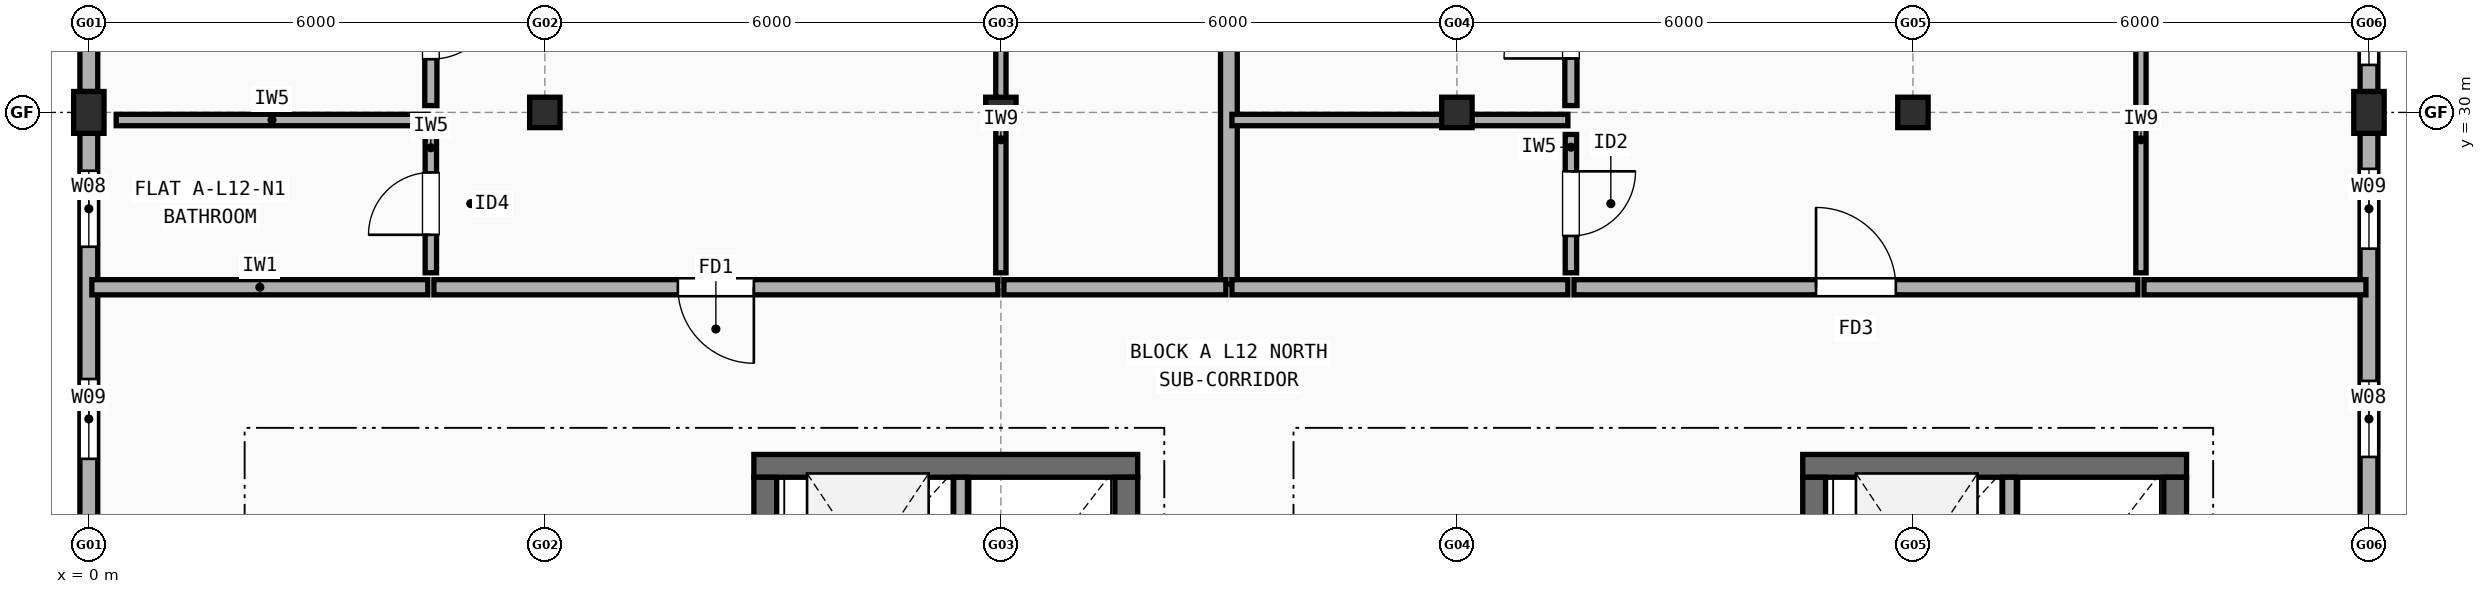
"""IFC4 building model, lengths in metres.
Left out: names, types, materials, properties, quantities, classifications, styles, units other than length and angle.
Written with IfcOpenShell. Run it as: python <this file> out.ifc"""

import sys

from ifc_helpers import new_model, si_unit, direction, frame, frame_2d, origin, origin_2d, place, context, subcontext, project, spatial, rectangle, extrude, element, fill, save


model = new_model("IFC4")
c1 = context("Model", 3, precision=1e-05, world=origin(), true_north=direction((0.0, 1.0)))
c2 = subcontext(c1, "Body", "Model", "MODEL_VIEW")
j1 = project(units=[si_unit("LENGTHUNIT", "METRE"), si_unit("PLANEANGLEUNIT", "RADIAN")], contexts=[c1])
p1 = place(None, origin())
s1 = spatial("IfcSite", under=j1, at=p1, CompositionType="ELEMENT")
p2 = place(p1, origin())
s2 = spatial("IfcBuilding", under=s1, at=p2, CompositionType="ELEMENT")
p3 = place(p2, frame((0.0, 0.0, 39.7)))
s3 = spatial("IfcBuildingStorey", under=s2, at=p3, CompositionType="ELEMENT", Elevation=39.7)
p4 = place(p3, frame((0.0, 30.0, 0.0), z_axis=(0.0, 0.0, 1.0), x_axis=(1.0, 0.0, 0.0)))
e1 = element("IfcColumn", 1, at=p4, inside=s3, PredefinedType="COLUMN", context=c2, shape_type="SweptSolid", body=[
    extrude(rectangle(XDim=0.4, YDim=0.55, at=origin_2d()), origin(), (0.0, 0.0, 1.0), 3.0),
])
for number, where, z_axis, x_axis in (
    (2, (6.0, 30.0, 0.0), (0.0, 0.0, 1.0), (1.0, 0.0, 0.0)),
    (3, (12.0, 30.0, 0.0), (0.0, 0.0, 1.0), (1.0, 0.0, 0.0)),
    (4, (18.0, 30.0, 0.0), (0.0, 0.0, 1.0), (1.0, 0.0, 0.0)),
    (5, (24.0, 30.0, 0.0), (0.0, 0.0, 1.0), (1.0, 0.0, 0.0)),
):
    element("IfcColumn", number, at=place(p3, frame(where, z_axis=z_axis, x_axis=x_axis)), inside=s3, PredefinedType="COLUMN", context=c2, shape_type="SweptSolid", body=[
        extrude(rectangle(XDim=0.4, YDim=0.4, at=origin_2d()), origin(), (0.0, 0.0, 1.0), 3.0),
    ])
p5 = place(p3, frame((30.0, 30.0, 0.0), z_axis=(0.0, 0.0, 1.0), x_axis=(1.0, 0.0, 0.0)))
e6 = element("IfcColumn", 6, at=p5, inside=s3, PredefinedType="COLUMN", context=c2, shape_type="SweptSolid", body=[
    extrude(rectangle(XDim=0.4, YDim=0.55, at=origin_2d()), origin(), (0.0, 0.0, 1.0), 3.0),
])
p6 = place(p3, frame((30.0, 24.275, 0.0), z_axis=(0.0, 0.0, 1.0), x_axis=(0.0, 1.0, 0.0)))
e7 = element("IfcWall", 7, at=p6, inside=s3, PredefinedType="STANDARD", context=c2, shape_type="SweptSolid", body=[
    extrude(rectangle(XDim=5.45, YDim=0.235, at=frame_2d((2.725, 0.0))), origin(), (0.0, 0.0, 1.0), 2.482),
])
p7 = place(p6, frame((1.192, 0.0, 0.9)))
e8 = element("IfcOpeningElement", 8, at=p7, cuts=e7, PredefinedType="OPENING", context=c2, shape_type="SweptSolid", body=[
    extrude(rectangle(XDim=1.0, YDim=1.4, at=frame_2d((0.5, 0.7))), frame((0.0, 0.127, 0.0), z_axis=(0.0, -1.0, 0.0), x_axis=(1.0, 0.0, 0.0)), (0.0, 0.0, 1.0), 0.255),
])
p8 = place(p6, frame((3.933, 0.0, 0.9)))
e9 = element("IfcOpeningElement", 9, at=p8, cuts=e7, PredefinedType="OPENING", context=c2, shape_type="SweptSolid", body=[
    extrude(rectangle(XDim=1.05, YDim=1.35, at=frame_2d((0.525, 0.675))), frame((0.0, 0.127, 0.0), z_axis=(0.0, -1.0, 0.0), x_axis=(1.0, 0.0, 0.0)), (0.0, 0.0, 1.0), 0.255),
])
p9 = place(p3, frame((30.0, 30.275, 0.0), z_axis=(0.0, 0.0, 1.0), x_axis=(0.0, 1.0, 0.0)))
e10 = element("IfcWall", 10, at=p9, inside=s3, PredefinedType="STANDARD", context=c2, shape_type="SweptSolid", body=[
    extrude(rectangle(XDim=5.45, YDim=0.235, at=frame_2d((2.725, 0.0))), origin(), (0.0, 0.0, 1.0), 2.482),
])
p10 = place(p9, frame((0.35, 0.0, 0.9)))
e11 = element("IfcOpeningElement", 11, at=p10, cuts=e10, PredefinedType="OPENING", context=c2, shape_type="SweptSolid", body=[
    extrude(rectangle(XDim=1.2, YDim=1.35, at=frame_2d((0.6, 0.675))), frame((0.0, 0.127, 0.0), z_axis=(0.0, -1.0, 0.0), x_axis=(1.0, 0.0, 0.0)), (0.0, 0.0, 1.0), 0.255),
])
p11 = place(p9, frame((3.9, 0.0, 0.9)))
e12 = element("IfcOpeningElement", 12, at=p11, cuts=e10, PredefinedType="OPENING", context=c2, shape_type="SweptSolid", body=[
    extrude(rectangle(XDim=1.2, YDim=1.35, at=frame_2d((0.6, 0.675))), frame((0.0, 0.127, 0.0), z_axis=(0.0, -1.0, 0.0), x_axis=(1.0, 0.0, 0.0)), (0.0, 0.0, 1.0), 0.255),
])
p12 = place(p3, frame((0.0, 35.725, 0.0), z_axis=(0.0, 0.0, 1.0), x_axis=(0.0, -1.0, 0.0)))
e13 = element("IfcWall", 13, at=p12, inside=s3, PredefinedType="STANDARD", context=c2, shape_type="SweptSolid", body=[
    extrude(rectangle(XDim=5.45, YDim=0.235, at=frame_2d((2.725, 0.0))), origin(), (0.0, 0.0, 1.0), 2.482),
])
p13 = place(p12, frame((1.192, 0.0, 0.9)))
e14 = element("IfcOpeningElement", 14, at=p13, cuts=e13, PredefinedType="OPENING", context=c2, shape_type="SweptSolid", body=[
    extrude(rectangle(XDim=0.9, YDim=1.4, at=frame_2d((0.45, 0.7))), frame((0.0, 0.127, 0.0), z_axis=(0.0, -1.0, 0.0), x_axis=(1.0, 0.0, 0.0)), (0.0, 0.0, 1.0), 0.255),
])
p14 = place(p12, frame((3.933, 0.0, 0.9)))
e15 = element("IfcOpeningElement", 15, at=p14, cuts=e13, PredefinedType="OPENING", context=c2, shape_type="SweptSolid", body=[
    extrude(rectangle(XDim=0.95, YDim=1.35, at=frame_2d((0.475, 0.675))), frame((0.0, 0.127, 0.0), z_axis=(0.0, -1.0, 0.0), x_axis=(1.0, 0.0, 0.0)), (0.0, 0.0, 1.0), 0.255),
])
p15 = place(p3, frame((0.0, 29.725, 0.0), z_axis=(0.0, 0.0, 1.0), x_axis=(0.0, -1.0, 0.0)))
e16 = element("IfcWall", 16, at=p15, inside=s3, PredefinedType="STANDARD", context=c2, shape_type="SweptSolid", body=[
    extrude(rectangle(XDim=5.45, YDim=0.235, at=frame_2d((2.725, 0.0))), origin(), (0.0, 0.0, 1.0), 2.482),
])
p16 = place(p15, frame((0.492, 0.0, 0.9)))
e17 = element("IfcOpeningElement", 17, at=p16, cuts=e16, PredefinedType="OPENING", context=c2, shape_type="SweptSolid", body=[
    extrude(rectangle(XDim=1.0, YDim=1.4, at=frame_2d((0.5, 0.7))), frame((0.0, 0.127, 0.0), z_axis=(0.0, -1.0, 0.0), x_axis=(1.0, 0.0, 0.0)), (0.0, 0.0, 1.0), 0.255),
])
p17 = place(p15, frame((3.232, 0.0, 0.9)))
e18 = element("IfcOpeningElement", 18, at=p17, cuts=e16, PredefinedType="OPENING", context=c2, shape_type="SweptSolid", body=[
    extrude(rectangle(XDim=1.05, YDim=1.35, at=frame_2d((0.525, 0.675))), frame((0.0, 0.127, 0.0), z_axis=(0.0, -1.0, 0.0), x_axis=(1.0, 0.0, 0.0)), (0.0, 0.0, 1.0), 0.255),
])
p18 = place(p3, frame((13.8, 25.35, 0.0), z_axis=(0.0, 0.0, 1.0), x_axis=(-1.0, 0.0, 0.0)))
e19 = element("IfcWall", 19, at=p18, inside=s3, PredefinedType="SHEAR", context=c2, shape_type="SweptSolid", body=[
    extrude(rectangle(XDim=5.05, YDim=0.3, at=frame_2d((2.525, 0.0))), origin(), (0.0, 0.0, 1.0), 3.0),
])
p19 = place(p3, frame((13.65, 18.75, 0.0), z_axis=(0.0, 0.0, 1.0), x_axis=(0.0, 1.0, 0.0)))
e20 = element("IfcWall", 20, at=p19, inside=s3, PredefinedType="SHEAR", context=c2, shape_type="SweptSolid", body=[
    extrude(rectangle(XDim=6.45, YDim=0.3, at=frame_2d((3.225, 0.0))), origin(), (0.0, 0.0, 1.0), 3.0),
])
p20 = place(p3, frame((8.9, 21.75, 0.0), z_axis=(0.0, 0.0, 1.0), x_axis=(0.0, 1.0, 0.0)))
e21 = element("IfcWall", 21, at=p20, inside=s3, PredefinedType="SHEAR", context=c2, shape_type="SweptSolid", body=[
    extrude(rectangle(XDim=3.45, YDim=0.3, at=frame_2d((1.725, 0.0))), origin(), (0.0, 0.0, 1.0), 3.0),
])
p21 = place(p3, frame((11.47, 22.94, 0.0), z_axis=(0.0, 0.0, 1.0), x_axis=(0.0, 1.0, 0.0)))
e22 = element("IfcWall", 22, at=p21, inside=s3, PredefinedType="SOLIDWALL", context=c2, shape_type="SweptSolid", body=[
    extrude(rectangle(XDim=2.26, YDim=0.18, at=frame_2d((1.13, 0.0))), origin(), (0.0, 0.0, 1.0), 3.0),
])
p22 = place(p3, frame((27.6, 25.35, 0.0), z_axis=(0.0, 0.0, 1.0), x_axis=(-1.0, 0.0, 0.0)))
e23 = element("IfcWall", 23, at=p22, inside=s3, PredefinedType="SHEAR", context=c2, shape_type="SweptSolid", body=[
    extrude(rectangle(XDim=5.05, YDim=0.3, at=frame_2d((2.525, 0.0))), origin(), (0.0, 0.0, 1.0), 3.0),
])
p23 = place(p3, frame((27.45, 18.75, 0.0), z_axis=(0.0, 0.0, 1.0), x_axis=(0.0, 1.0, 0.0)))
e24 = element("IfcWall", 24, at=p23, inside=s3, PredefinedType="SHEAR", context=c2, shape_type="SweptSolid", body=[
    extrude(rectangle(XDim=6.45, YDim=0.3, at=frame_2d((3.225, 0.0))), origin(), (0.0, 0.0, 1.0), 3.0),
])
p24 = place(p3, frame((22.7, 21.75, 0.0), z_axis=(0.0, 0.0, 1.0), x_axis=(0.0, 1.0, 0.0)))
e25 = element("IfcWall", 25, at=p24, inside=s3, PredefinedType="SHEAR", context=c2, shape_type="SweptSolid", body=[
    extrude(rectangle(XDim=3.45, YDim=0.3, at=frame_2d((1.725, 0.0))), origin(), (0.0, 0.0, 1.0), 3.0),
])
p25 = place(p3, frame((25.27, 22.94, 0.0), z_axis=(0.0, 0.0, 1.0), x_axis=(0.0, 1.0, 0.0)))
e26 = element("IfcWall", 26, at=p25, inside=s3, PredefinedType="SOLIDWALL", context=c2, shape_type="SweptSolid", body=[
    extrude(rectangle(XDim=2.26, YDim=0.18, at=frame_2d((1.13, 0.0))), origin(), (0.0, 0.0, 1.0), 3.0),
])
p26 = place(p3, frame((15.0, 27.74, 0.0), z_axis=(0.0, 0.0, 1.0), x_axis=(0.0, 1.0, 0.0)))
e27 = element("IfcWall", 27, at=p26, inside=s3, PredefinedType="SOLIDWALL", context=c2, shape_type="SweptSolid", body=[
    extrude(rectangle(XDim=7.87, YDim=0.22, at=frame_2d((3.935, 0.0))), origin(), (0.0, 0.0, 1.0), 2.532),
])
p27 = place(p3, frame((0.04, 27.7, 0.0), z_axis=(0.0, 0.0, 1.0), x_axis=(1.0, 0.0, 0.0)))
e28 = element("IfcWall", 28, at=p27, inside=s3, PredefinedType="SOLIDWALL", context=c2, shape_type="SweptSolid", body=[
    extrude(rectangle(XDim=4.42, YDim=0.2, at=frame_2d((2.21, 0.0))), origin(), (0.0, 0.0, 1.0), 2.482),
])
p28 = place(p3, frame((4.54, 27.7, 0.0), z_axis=(0.0, 0.0, 1.0), x_axis=(1.0, 0.0, 0.0)))
e29 = element("IfcWall", 29, at=p28, inside=s3, PredefinedType="SOLIDWALL", context=c2, shape_type="SweptSolid", body=[
    extrude(rectangle(XDim=7.42, YDim=0.2, at=frame_2d((3.71, 0.0))), origin(), (0.0, 0.0, 1.0), 2.508),
])
p29 = place(p28, frame((3.21, 0.0, 0.0)))
e30 = element("IfcOpeningElement", 30, at=p29, cuts=e29, PredefinedType="OPENING", context=c2, shape_type="SweptSolid", body=[
    extrude(rectangle(XDim=1.0, YDim=2.15, at=frame_2d((0.5, 1.075))), frame((0.0, 0.11, 0.0), z_axis=(0.0, -1.0, 0.0), x_axis=(1.0, 0.0, 0.0)), (0.0, 0.0, 1.0), 0.22),
])
p30 = place(p3, frame((4.5, 30.09, 0.0), z_axis=(0.0, 0.0, 1.0), x_axis=(0.0, 1.0, 0.0)))
e31 = element("IfcWall", 31, at=p30, inside=s3, PredefinedType="PLUMBINGWALL", context=c2, shape_type="SweptSolid", body=[
    extrude(rectangle(XDim=2.12, YDim=0.16, at=frame_2d((1.06, 0.0))), origin(), (0.0, 0.0, 1.0), 2.532),
])
p31 = place(p30, frame((0.61, 0.0, 0.0)))
e32 = element("IfcOpeningElement", 32, at=p31, cuts=e31, PredefinedType="OPENING", context=c2, shape_type="SweptSolid", body=[
    extrude(rectangle(XDim=0.9, YDim=2.1, at=frame_2d((0.45, 1.05))), frame((0.0, 0.09, 0.0), z_axis=(0.0, -1.0, 0.0), x_axis=(1.0, 0.0, 0.0)), (0.0, 0.0, 1.0), 0.18),
])
p32 = place(p3, frame((4.5, 27.89, 0.0), z_axis=(0.0, 0.0, 1.0), x_axis=(0.0, 1.0, 0.0)))
e33 = element("IfcWall", 33, at=p32, inside=s3, PredefinedType="PARTITIONING", context=c2, shape_type="SweptSolid", body=[
    extrude(rectangle(XDim=1.82, YDim=0.15, at=frame_2d((0.91, 0.0))), origin(), (0.0, 0.0, 1.0), 3.0),
])
p33 = place(p32, frame((0.5, 0.0, 0.0)))
e34 = element("IfcOpeningElement", 34, at=p33, cuts=e33, PredefinedType="OPENING", context=c2, shape_type="SweptSolid", body=[
    extrude(rectangle(XDim=0.82, YDim=2.08, at=frame_2d((0.41, 1.04))), frame((0.0, 0.085, 0.0), z_axis=(0.0, -1.0, 0.0), x_axis=(1.0, 0.0, 0.0)), (0.0, 0.0, 1.0), 0.17),
])
p34 = place(p3, frame((0.36, 29.9, 0.0), z_axis=(0.0, 0.0, 1.0), x_axis=(1.0, 0.0, 0.0)))
e35 = element("IfcWall", 35, at=p34, inside=s3, PredefinedType="PARTITIONING", context=c2, shape_type="SweptSolid", body=[
    extrude(rectangle(XDim=4.1, YDim=0.15, at=frame_2d((2.05, 0.0))), origin(), (0.0, 0.0, 1.0), 2.532),
])
p35 = place(p3, frame((12.04, 27.7, 0.0), z_axis=(0.0, 0.0, 1.0), x_axis=(1.0, 0.0, 0.0)))
e36 = element("IfcWall", 36, at=p35, inside=s3, PredefinedType="SOLIDWALL", context=c2, shape_type="SweptSolid", body=[
    extrude(rectangle(XDim=2.92, YDim=0.2, at=frame_2d((1.46, 0.0))), origin(), (0.0, 0.0, 1.0), 2.508),
])
p36 = place(p3, frame((12.0, 27.89, 0.0), z_axis=(0.0, 0.0, 1.0), x_axis=(0.0, 1.0, 0.0)))
e37 = element("IfcWall", 37, at=p36, inside=s3, PredefinedType="PARTITIONING", context=c2, shape_type="SweptSolid", body=[
    extrude(rectangle(XDim=7.6, YDim=0.135, at=frame_2d((3.8, 0.0))), origin(), (0.0, 0.0, 1.0), 2.508),
])
p37 = place(p36, frame((3.65, 0.0, 0.0)))
e38 = element("IfcOpeningElement", 38, at=p37, cuts=e37, PredefinedType="OPENING", context=c2, shape_type="SweptSolid", body=[
    extrude(rectangle(XDim=0.9, YDim=2.1, at=frame_2d((0.45, 1.05))), frame((0.0, 0.077, 0.0), z_axis=(0.0, -1.0, 0.0), x_axis=(1.0, 0.0, 0.0)), (0.0, 0.0, 1.0), 0.155),
])
p38 = place(p3, frame((15.04, 27.7, 0.0), z_axis=(0.0, 0.0, 1.0), x_axis=(1.0, 0.0, 0.0)))
e39 = element("IfcWall", 39, at=p38, inside=s3, PredefinedType="SOLIDWALL", context=c2, shape_type="SweptSolid", body=[
    extrude(rectangle(XDim=4.42, YDim=0.2, at=frame_2d((2.21, 0.0))), origin(), (0.0, 0.0, 1.0), 3.0),
])
p39 = place(p3, frame((19.54, 27.7, 0.0), z_axis=(0.0, 0.0, 1.0), x_axis=(1.0, 0.0, 0.0)))
e40 = element("IfcWall", 40, at=p39, inside=s3, PredefinedType="SOLIDWALL", context=c2, shape_type="SweptSolid", body=[
    extrude(rectangle(XDim=7.42, YDim=0.2, at=frame_2d((3.71, 0.0))), origin(), (0.0, 0.0, 1.0), 3.0),
])
p40 = place(p39, frame((3.185, 0.0, 0.0)))
e41 = element("IfcOpeningElement", 41, at=p40, cuts=e40, PredefinedType="OPENING", context=c2, shape_type="SweptSolid", body=[
    extrude(rectangle(XDim=1.05, YDim=2.15, at=frame_2d((0.525, 1.075))), frame((0.0, 0.11, 0.0), z_axis=(0.0, -1.0, 0.0), x_axis=(1.0, 0.0, 0.0)), (0.0, 0.0, 1.0), 0.22),
])
p41 = place(p3, frame((19.5, 30.09, 0.0), z_axis=(0.0, 0.0, 1.0), x_axis=(0.0, 1.0, 0.0)))
e42 = element("IfcWall", 42, at=p41, inside=s3, PredefinedType="PLUMBINGWALL", context=c2, shape_type="SweptSolid", body=[
    extrude(rectangle(XDim=2.12, YDim=0.16, at=frame_2d((1.06, 0.0))), origin(), (0.0, 0.0, 1.0), 2.532),
])
p42 = place(p41, frame((0.62, 0.0, 0.0)))
e43 = element("IfcOpeningElement", 43, at=p42, cuts=e42, PredefinedType="OPENING", context=c2, shape_type="SweptSolid", body=[
    extrude(rectangle(XDim=0.88, YDim=2.1, at=frame_2d((0.44, 1.05))), frame((0.0, 0.09, 0.0), z_axis=(0.0, -1.0, 0.0), x_axis=(1.0, 0.0, 0.0)), (0.0, 0.0, 1.0), 0.18),
])
p43 = place(p3, frame((19.5, 27.89, 0.0), z_axis=(0.0, 0.0, 1.0), x_axis=(0.0, 1.0, 0.0)))
e44 = element("IfcWall", 44, at=p43, inside=s3, PredefinedType="PARTITIONING", context=c2, shape_type="SweptSolid", body=[
    extrude(rectangle(XDim=1.82, YDim=0.15, at=frame_2d((0.91, 0.0))), origin(), (0.0, 0.0, 1.0), 3.0),
])
p44 = place(p43, frame((0.485, 0.0, 0.0)))
e45 = element("IfcOpeningElement", 45, at=p44, cuts=e44, PredefinedType="OPENING", context=c2, shape_type="SweptSolid", body=[
    extrude(rectangle(XDim=0.85, YDim=2.1, at=frame_2d((0.425, 1.05))), frame((0.0, 0.085, 0.0), z_axis=(0.0, -1.0, 0.0), x_axis=(1.0, 0.0, 0.0)), (0.0, 0.0, 1.0), 0.17),
])
p45 = place(p3, frame((15.04, 29.9, 0.0), z_axis=(0.0, 0.0, 1.0), x_axis=(1.0, 0.0, 0.0)))
e46 = element("IfcWall", 46, at=p45, inside=s3, PredefinedType="PARTITIONING", context=c2, shape_type="SweptSolid", body=[
    extrude(rectangle(XDim=4.42, YDim=0.15, at=frame_2d((2.21, 0.0))), origin(), (0.0, 0.0, 1.0), 2.532),
])
p46 = place(p3, frame((27.04, 27.7, 0.0), z_axis=(0.0, 0.0, 1.0), x_axis=(1.0, 0.0, 0.0)))
e47 = element("IfcWall", 47, at=p46, inside=s3, PredefinedType="SOLIDWALL", context=c2, shape_type="SweptSolid", body=[
    extrude(rectangle(XDim=2.92, YDim=0.2, at=frame_2d((1.46, 0.0))), origin(), (0.0, 0.0, 1.0), 2.482),
])
p47 = place(p3, frame((27.0, 27.89, 0.0), z_axis=(0.0, 0.0, 1.0), x_axis=(0.0, 1.0, 0.0)))
e48 = element("IfcWall", 48, at=p47, inside=s3, PredefinedType="PARTITIONING", context=c2, shape_type="SweptSolid", body=[
    extrude(rectangle(XDim=7.92, YDim=0.135, at=frame_2d((3.96, 0.0))), origin(), (0.0, 0.0, 1.0), 2.532),
])
p48 = place(p47, frame((3.65, 0.0, 0.0)))
e49 = element("IfcOpeningElement", 49, at=p48, cuts=e48, PredefinedType="OPENING", context=c2, shape_type="SweptSolid", body=[
    extrude(rectangle(XDim=0.88, YDim=2.1, at=frame_2d((0.44, 1.05))), frame((0.0, 0.077, 0.0), z_axis=(0.0, -1.0, 0.0), x_axis=(1.0, 0.0, 0.0)), (0.0, 0.0, 1.0), 0.155),
])
p49 = place(p7, origin())
e50 = element("IfcWindow", 50, at=p49, inside=s3, PartitioningType="SINGLE_PANEL", PredefinedType="WINDOW", context=c2, shape_type="SweptSolid", body=[
    extrude(rectangle(XDim=1.0, YDim=1.4, at=frame_2d((0.5, 0.7))), frame((0.0, 0.03, 0.0), z_axis=(0.0, -1.0, 0.0), x_axis=(1.0, 0.0, 0.0)), (0.0, 0.0, 1.0), 0.06),
])
fill(e8, e50)
p50 = place(p8, origin())
e51 = element("IfcWindow", 51, at=p50, inside=s3, PartitioningType="SINGLE_PANEL", PredefinedType="WINDOW", context=c2, shape_type="SweptSolid", body=[
    extrude(rectangle(XDim=1.05, YDim=1.35, at=frame_2d((0.525, 0.675))), frame((0.0, 0.03, 0.0), z_axis=(0.0, -1.0, 0.0), x_axis=(1.0, 0.0, 0.0)), (0.0, 0.0, 1.0), 0.06),
])
fill(e9, e51)
p51 = place(p10, origin())
e52 = element("IfcWindow", 52, at=p51, inside=s3, PartitioningType="SINGLE_PANEL", PredefinedType="WINDOW", context=c2, shape_type="SweptSolid", body=[
    extrude(rectangle(XDim=1.2, YDim=1.35, at=frame_2d((0.6, 0.675))), frame((0.0, 0.03, 0.0), z_axis=(0.0, -1.0, 0.0), x_axis=(1.0, 0.0, 0.0)), (0.0, 0.0, 1.0), 0.06),
])
fill(e11, e52)
p52 = place(p16, origin())
e53 = element("IfcWindow", 53, at=p52, inside=s3, PartitioningType="SINGLE_PANEL", PredefinedType="WINDOW", context=c2, shape_type="SweptSolid", body=[
    extrude(rectangle(XDim=1.0, YDim=1.4, at=frame_2d((0.5, 0.7))), frame((0.0, 0.03, 0.0), z_axis=(0.0, -1.0, 0.0), x_axis=(1.0, 0.0, 0.0)), (0.0, 0.0, 1.0), 0.06),
])
fill(e17, e53)
p53 = place(p17, origin())
e54 = element("IfcWindow", 54, at=p53, inside=s3, PartitioningType="SINGLE_PANEL", PredefinedType="WINDOW", context=c2, shape_type="SweptSolid", body=[
    extrude(rectangle(XDim=1.05, YDim=1.35, at=frame_2d((0.525, 0.675))), frame((0.0, 0.03, 0.0), z_axis=(0.0, -1.0, 0.0), x_axis=(1.0, 0.0, 0.0)), (0.0, 0.0, 1.0), 0.06),
])
fill(e18, e54)
p54 = place(p29, origin())
e55 = element("IfcDoor", 55, at=p54, inside=s3, OperationType="SINGLE_SWING_RIGHT", PredefinedType="DOOR", context=c2, shape_type="SweptSolid", body=[
    extrude(rectangle(XDim=1.0, YDim=2.15, at=frame_2d((0.5, 1.075))), frame((0.0, 0.025, 0.0), z_axis=(0.0, -1.0, 0.0), x_axis=(1.0, 0.0, 0.0)), (0.0, 0.0, 1.0), 0.05),
])
fill(e30, e55)
p55 = place(p31, origin())
e56 = element("IfcDoor", 56, at=p55, inside=s3, OperationType="SINGLE_SWING_RIGHT", PredefinedType="DOOR", context=c2, shape_type="SweptSolid", body=[
    extrude(rectangle(XDim=0.9, YDim=2.1, at=frame_2d((0.45, 1.05))), frame((0.0, 0.025, 0.0), z_axis=(0.0, -1.0, 0.0), x_axis=(1.0, 0.0, 0.0)), (0.0, 0.0, 1.0), 0.05),
])
fill(e32, e56)
p56 = place(p33, origin())
e57 = element("IfcDoor", 57, at=p56, inside=s3, OperationType="SINGLE_SWING_LEFT", PredefinedType="DOOR", context=c2, shape_type="SweptSolid", body=[
    extrude(rectangle(XDim=0.82, YDim=2.08, at=frame_2d((0.41, 1.04))), frame((0.0, 0.025, 0.0), z_axis=(0.0, -1.0, 0.0), x_axis=(1.0, 0.0, 0.0)), (0.0, 0.0, 1.0), 0.05),
])
fill(e34, e57)
p57 = place(p40, origin())
e58 = element("IfcDoor", 58, at=p57, inside=s3, OperationType="SINGLE_SWING_LEFT", PredefinedType="DOOR", context=c2, shape_type="SweptSolid", body=[
    extrude(rectangle(XDim=1.05, YDim=2.15, at=frame_2d((0.525, 1.075))), frame((0.0, 0.025, 0.0), z_axis=(0.0, -1.0, 0.0), x_axis=(1.0, 0.0, 0.0)), (0.0, 0.0, 1.0), 0.05),
])
fill(e41, e58)
p58 = place(p42, origin())
e59 = element("IfcDoor", 59, at=p58, inside=s3, OperationType="SINGLE_SWING_LEFT", PredefinedType="DOOR", context=c2, shape_type="SweptSolid", body=[
    extrude(rectangle(XDim=0.88, YDim=2.1, at=frame_2d((0.44, 1.05))), frame((0.0, 0.025, 0.0), z_axis=(0.0, -1.0, 0.0), x_axis=(1.0, 0.0, 0.0)), (0.0, 0.0, 1.0), 0.05),
])
fill(e43, e59)
p59 = place(p44, origin())
e60 = element("IfcDoor", 60, at=p59, inside=s3, OperationType="SINGLE_SWING_RIGHT", PredefinedType="DOOR", context=c2, shape_type="SweptSolid", body=[
    extrude(rectangle(XDim=0.85, YDim=2.1, at=frame_2d((0.425, 1.05))), frame((0.0, 0.025, 0.0), z_axis=(0.0, -1.0, 0.0), x_axis=(1.0, 0.0, 0.0)), (0.0, 0.0, 1.0), 0.05),
])
fill(e45, e60)
save(model, sys.argv[1])
